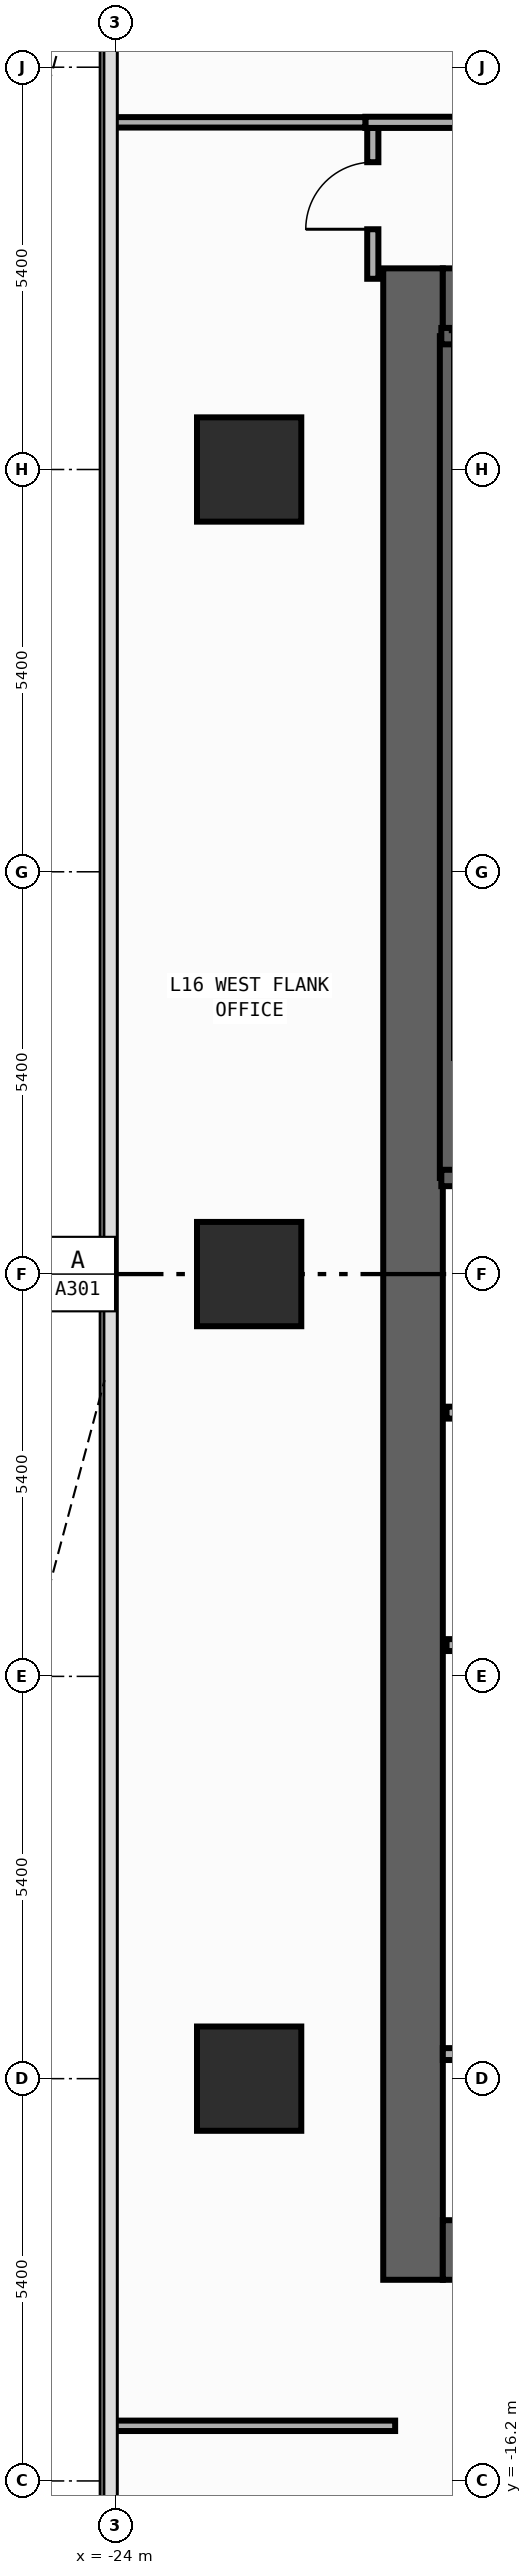
"""IFC4 building model, lengths in metres.
Left out: names, types, materials, properties, quantities, classifications, styles, units other than length and angle.
Written with IfcOpenShell. Run it as: python <this file> out.ifc"""

import sys

from ifc_helpers import new_model, si_unit, direction, frame, frame_2d, origin, origin_2d, place, context, subcontext, project, spatial, rectangle, extrude, element, fill, save


model = new_model("IFC4")
c1 = context("Model", 3, precision=1e-05, world=origin(), true_north=direction((0.0, 1.0)))
c2 = subcontext(c1, "Body", "Model", "MODEL_VIEW")
j1 = project(units=[si_unit("LENGTHUNIT", "METRE"), si_unit("PLANEANGLEUNIT", "RADIAN")], contexts=[c1])
p1 = place(None, origin())
s1 = spatial("IfcSite", under=j1, at=p1, CompositionType="ELEMENT")
p2 = place(p1, origin())
s2 = spatial("IfcBuilding", under=s1, at=p2, CompositionType="ELEMENT")
p3 = place(p2, frame((0.0, 0.0, 68.0)))
s3 = spatial("IfcBuildingStorey", under=s2, at=p3, CompositionType="ELEMENT", Elevation=68.0)
p4 = place(p3, frame((-20.0, -13.5, 0.0), z_axis=(0.0, 0.0, 1.0), x_axis=(0.0, 1.0, 0.0)))
e1 = element("IfcWall", 1, at=p4, inside=s3, PredefinedType="SHEAR", context=c2, shape_type="SweptSolid", body=[
    extrude(rectangle(XDim=27.0, YDim=0.8, at=frame_2d((13.5, 0.0))), origin(), (0.0, 0.0, 1.0), 3.94),
])
for number, where, z_axis, x_axis in (
    (2, (-19.6, -13.1, 0.0), (0.0, 0.0, 1.0), (1.0, 0.0, 0.0)),
    (3, (-19.6, 13.1, 0.0), (0.0, 0.0, 1.0), (1.0, 0.0, 0.0)),
):
    element("IfcWall", number, at=place(p3, frame(where, z_axis=z_axis, x_axis=x_axis)), inside=s3, PredefinedType="SHEAR", context=c2, shape_type="SweptSolid", body=[
        extrude(rectangle(XDim=6.8, YDim=0.8, at=frame_2d((3.4, 0.0))), origin(), (0.0, 0.0, 1.0), 3.94),
    ])
p5 = place(p3, frame((-19.53, 1.29, 0.0), z_axis=(0.0, 0.0, 1.0), x_axis=(0.0, 1.0, 0.0)))
e4 = element("IfcWall", 4, at=p5, inside=s3, PredefinedType="SHEAR", context=c2, shape_type="SweptSolid", body=[
    extrude(rectangle(XDim=11.3, YDim=0.22, at=frame_2d((5.65, 0.0))), origin(), (0.0, 0.0, 1.0), 3.94),
])
p6 = place(p3, frame((-19.62, 12.59, 0.0), z_axis=(0.0, 0.0, 1.0), x_axis=(1.0, 0.0, 0.0)))
e5 = element("IfcWall", 5, at=p6, inside=s3, PredefinedType="SHEAR", context=c2, shape_type="SweptSolid", body=[
    extrude(rectangle(XDim=3.915, YDim=0.22, at=frame_2d((1.958, 0.0))), origin(), (0.0, 0.0, 1.0), 3.94),
])
p7 = place(p3, frame((-19.62, 1.29, 0.0), z_axis=(0.0, 0.0, 1.0), x_axis=(1.0, 0.0, 0.0)))
e6 = element("IfcWall", 6, at=p7, inside=s3, PredefinedType="SHEAR", context=c2, shape_type="SweptSolid", body=[
    extrude(rectangle(XDim=3.915, YDim=0.22, at=frame_2d((1.958, 0.0))), origin(), (0.0, 0.0, 1.0), 3.94),
])
p8 = place(p7, frame((1.08, 0.0, 0.0)))
e7 = element("IfcOpeningElement", 7, at=p8, cuts=e6, PredefinedType="OPENING", context=c2, shape_type="SweptSolid", body=[
    extrude(rectangle(XDim=1.1, YDim=2.2, at=frame_2d((0.55, 1.1))), frame((0.0, 0.12, 0.0), z_axis=(0.0, -1.0, 0.0), x_axis=(1.0, 0.0, 0.0)), (0.0, 0.0, 1.0), 0.24),
])
for number, where, z_axis, x_axis in (
    (8, (-22.2, -10.8, 0.0), (0.0, 0.0, 1.0), (1.0, 0.0, 0.0)),
    (9, (-22.2, 0.0, 0.0), (0.0, 0.0, 1.0), (1.0, 0.0, 0.0)),
    (10, (-22.2, 10.8, 0.0), (0.0, 0.0, 1.0), (1.0, 0.0, 0.0)),
):
    element("IfcColumn", number, at=place(p3, frame(where, z_axis=z_axis, x_axis=x_axis)), inside=s3, PredefinedType="COLUMN", context=c2, shape_type="SweptSolid", body=[
        extrude(rectangle(XDim=1.4, YDim=1.4, at=origin_2d()), origin(), (0.0, 0.0, 1.0), 4.2),
    ])
p9 = place(p3, frame((-19.55, -1.86, 0.0), z_axis=(0.0, 0.0, 1.0), x_axis=(1.0, 0.0, 0.0)))
e11 = element("IfcWall", 11, at=p9, inside=s3, PredefinedType="STANDARD", context=c2, shape_type="SweptSolid", body=[
    extrude(rectangle(XDim=3.8, YDim=0.16, at=frame_2d((1.9, 0.0))), origin(), (0.0, 0.0, 1.0), 3.94),
])
p10 = place(p9, frame((1.18, 0.0, 0.0)))
e12 = element("IfcOpeningElement", 12, at=p10, cuts=e11, PredefinedType="OPENING", context=c2, shape_type="SweptSolid", body=[
    extrude(rectangle(XDim=1.15, YDim=2.2, at=frame_2d((0.575, 1.1))), frame((0.0, 0.09, 0.0), z_axis=(0.0, -1.0, 0.0), x_axis=(1.0, 0.0, 0.0)), (0.0, 0.0, 1.0), 0.18),
])
p11 = place(p3, frame((-19.55, -4.98, 0.0), z_axis=(0.0, 0.0, 1.0), x_axis=(1.0, 0.0, 0.0)))
e13 = element("IfcWall", 13, at=p11, inside=s3, PredefinedType="STANDARD", context=c2, shape_type="SweptSolid", body=[
    extrude(rectangle(XDim=3.8, YDim=0.16, at=frame_2d((1.9, 0.0))), origin(), (0.0, 0.0, 1.0), 3.94),
])
p12 = place(p3, frame((-19.6, -10.47, 0.0), z_axis=(0.0, 0.0, 1.0), x_axis=(1.0, 0.0, 0.0)))
e14 = element("IfcWall", 14, at=p12, inside=s3, PredefinedType="PARTITIONING", context=c2, shape_type="SweptSolid", body=[
    extrude(rectangle(XDim=2.29, YDim=0.16, at=frame_2d((1.145, 0.0))), origin(), (0.0, 0.0, 1.0), 3.94),
])
p13 = place(p3, frame((-20.54, 13.36, 0.0), z_axis=(0.0, 0.0, 1.0), x_axis=(0.0, 1.0, 0.0)))
e15 = element("IfcWall", 15, at=p13, inside=s3, PredefinedType="PARTITIONING", context=c2, shape_type="SweptSolid", body=[
    extrude(rectangle(XDim=2.025, YDim=0.15, at=frame_2d((1.012, 0.0))), origin(), (0.0, 0.0, 1.0), 3.94),
])
p14 = place(p13, frame((0.665, 0.0, 0.0)))
e16 = element("IfcOpeningElement", 16, at=p14, cuts=e15, PredefinedType="OPENING", context=c2, shape_type="SweptSolid", body=[
    extrude(rectangle(XDim=0.9, YDim=2.15, at=frame_2d((0.45, 1.075))), frame((0.0, 0.085, 0.0), z_axis=(0.0, -1.0, 0.0), x_axis=(1.0, 0.0, 0.0)), (0.0, 0.0, 1.0), 0.17),
])
p15 = place(p3, frame((-20.64, 15.46, 0.0), z_axis=(0.0, 0.0, 1.0), x_axis=(1.0, 0.0, 0.0)))
e17 = element("IfcWall", 17, at=p15, inside=s3, PredefinedType="PARTITIONING", context=c2, shape_type="SweptSolid", body=[
    extrude(rectangle(XDim=8.65, YDim=0.15, at=frame_2d((4.325, 0.0))), origin(), (0.0, 0.0, 1.0), 3.94),
])
p16 = place(p15, frame((2.871, 0.0, 0.0)))
e18 = element("IfcOpeningElement", 18, at=p16, cuts=e17, PredefinedType="OPENING", context=c2, shape_type="SweptSolid", body=[
    extrude(rectangle(XDim=0.9, YDim=2.15, at=frame_2d((0.45, 1.075))), frame((0.0, 0.085, 0.0), z_axis=(0.0, -1.0, 0.0), x_axis=(1.0, 0.0, 0.0)), (0.0, 0.0, 1.0), 0.17),
])
p17 = place(p3, frame((-24.055, 15.46, 0.0), z_axis=(0.0, 0.0, 1.0), x_axis=(1.0, 0.0, 0.0)))
e19 = element("IfcWall", 19, at=p17, inside=s3, PredefinedType="PARTITIONING", context=c2, shape_type="SweptSolid", body=[
    extrude(rectangle(XDim=3.415, YDim=0.14, at=frame_2d((1.708, 0.0))), origin(), (0.0, 0.0, 1.0), 3.94),
])
p18 = place(p3, frame((-24.055, -15.46, 0.0), z_axis=(0.0, 0.0, 1.0), x_axis=(1.0, 0.0, 0.0)))
e20 = element("IfcWall", 20, at=p18, inside=s3, PredefinedType="PARTITIONING", context=c2, shape_type="SweptSolid", body=[
    extrude(rectangle(XDim=3.815, YDim=0.14, at=frame_2d((1.907, 0.0))), origin(), (0.0, 0.0, 1.0), 3.94),
])
p19 = place(p14, origin())
e21 = element("IfcDoor", 21, at=p19, inside=s3, OperationType="SINGLE_SWING_LEFT", PredefinedType="DOOR", context=c2, shape_type="SweptSolid", body=[
    extrude(rectangle(XDim=0.9, YDim=2.15, at=frame_2d((0.45, 1.075))), frame((0.0, 0.025, 0.0), z_axis=(0.0, -1.0, 0.0), x_axis=(1.0, 0.0, 0.0)), (0.0, 0.0, 1.0), 0.05),
])
fill(e16, e21)
save(model, sys.argv[1])
